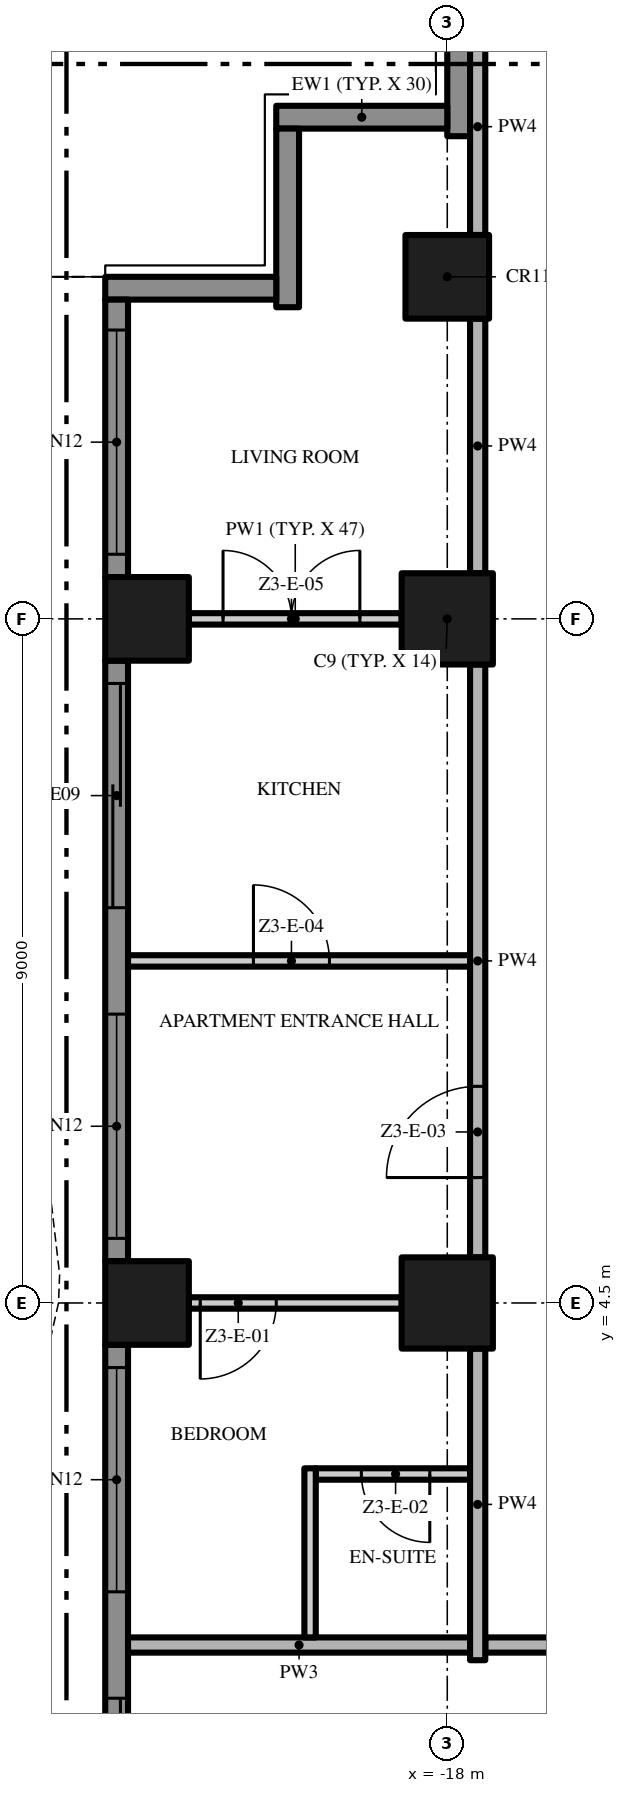
"""IFC4 building model, lengths in metres.
Left out: names, types, materials, properties, quantities, classifications, styles, units other than length and angle.
Written with IfcOpenShell. Run it as: python <this file> out.ifc"""

import sys

from ifc_helpers import new_model, si_unit, direction, frame, frame_2d, origin, origin_2d, place, context, subcontext, project, spatial, polyline, rectangle, outline, extrude, element, fill, save


model = new_model("IFC4")
c1 = context("Model", 3, precision=1e-05, world=origin(), true_north=direction((0.0, 1.0)))
c2 = subcontext(c1, "Body", "Model", "MODEL_VIEW")
j1 = project(units=[si_unit("LENGTHUNIT", "METRE"), si_unit("PLANEANGLEUNIT", "RADIAN")], contexts=[c1])
p1 = place(None, origin())
s1 = spatial("IfcSite", under=j1, at=p1, CompositionType="ELEMENT")
p2 = place(p1, origin())
s2 = spatial("IfcBuilding", under=s1, at=p2, CompositionType="ELEMENT")
p3 = place(p2, frame((0.0, 0.0, 170.6)))
s3 = spatial("IfcBuildingStorey", under=s2, at=p3, CompositionType="ELEMENT", Elevation=170.6)
for number, where, z_axis, x_axis in (
    (1, (-18.0, 13.5, 0.0), (0.0, 0.0, 1.0), (1.0, 0.0, 0.0)),
    (2, (-18.0, 4.5, 0.0), (0.0, 0.0, 1.0), (1.0, 0.0, 0.0)),
):
    element("IfcColumn", number, at=place(p3, frame(where, z_axis=z_axis, x_axis=x_axis)), inside=s3, PredefinedType="COLUMN", context=c2, shape_type="SweptSolid", body=[
        extrude(rectangle(XDim=1.2, YDim=1.2, at=origin_2d()), origin(), (0.0, 0.0, 1.0), 3.5),
    ])
for number, where, z_axis, x_axis in (
    (3, (-21.95, 13.5, 0.0), (0.0, 0.0, 1.0), (1.0, 0.0, 0.0)),
    (4, (-18.0, 18.0, 0.0), (0.0, 0.0, 1.0), (1.0, 0.0, 0.0)),
    (5, (-21.95, 4.5, 0.0), (0.0, 0.0, 1.0), (1.0, 0.0, 0.0)),
):
    element("IfcColumn", number, at=place(p3, frame(where, z_axis=z_axis, x_axis=x_axis)), inside=s3, PredefinedType="COLUMN", context=c2, shape_type="SweptSolid", body=[
        extrude(rectangle(XDim=1.1, YDim=1.1, at=origin_2d()), origin(), (0.0, 0.0, 1.0), 3.5),
    ])
p4 = place(p3, frame((-17.85, 19.85, 0.0), z_axis=(0.0, 0.0, 1.0), x_axis=(0.0, 1.0, 0.0)))
e6 = element("IfcWall", 6, at=p4, inside=s3, PredefinedType="SOLIDWALL", context=c2, shape_type="SweptSolid", body=[
    extrude(rectangle(XDim=1.55, YDim=0.3, at=frame_2d((0.775, 0.0))), origin(), (0.0, 0.0, 1.0), 3.5),
])
p5 = place(p3, frame((-20.25, 20.1, 0.0), z_axis=(0.0, 0.0, 1.0), x_axis=(1.0, 0.0, 0.0)))
e7 = element("IfcWall", 7, at=p5, inside=s3, PredefinedType="SOLIDWALL", context=c2, shape_type="SweptSolid", body=[
    extrude(rectangle(XDim=2.25, YDim=0.3, at=frame_2d((1.125, 0.0))), origin(), (0.0, 0.0, 1.0), 3.5),
])
p6 = place(p3, frame((-20.1, 17.6, 0.0), z_axis=(0.0, 0.0, 1.0), x_axis=(0.0, 1.0, 0.0)))
e8 = element("IfcWall", 8, at=p6, inside=s3, PredefinedType="SOLIDWALL", context=c2, shape_type="SweptSolid", body=[
    extrude(rectangle(XDim=2.35, YDim=0.3, at=frame_2d((1.175, 0.0))), origin(), (0.0, 0.0, 1.0), 3.5),
])
p7 = place(p3, frame((-22.5, 17.85, 0.0), z_axis=(0.0, 0.0, 1.0), x_axis=(1.0, 0.0, 0.0)))
e9 = element("IfcWall", 9, at=p7, inside=s3, PredefinedType="SOLIDWALL", context=c2, shape_type="SweptSolid", body=[
    extrude(rectangle(XDim=2.25, YDim=0.3, at=frame_2d((1.125, 0.0))), origin(), (0.0, 0.0, 1.0), 3.5),
])
p8 = place(p3, frame((-22.35, 14.05, 0.0), z_axis=(0.0, 0.0, 1.0), x_axis=(0.0, 1.0, 0.0)))
e10 = element("IfcWall", 10, at=p8, inside=s3, PredefinedType="SOLIDWALL", context=c2, shape_type="SweptSolid", body=[
    extrude(rectangle(XDim=3.65, YDim=0.3, at=frame_2d((1.825, 0.0))), origin(), (0.0, 0.0, 1.0), 3.5),
])
p9 = place(p8, frame((0.3, 0.0, 0.45)))
e11 = element("IfcOpeningElement", 11, at=p9, cuts=e10, PredefinedType="OPENING", context=c2, shape_type="SweptSolid", body=[
    extrude(rectangle(XDim=2.95, YDim=2.65, at=frame_2d((1.475, 1.325))), frame((0.0, 0.16, 0.0), z_axis=(0.0, -1.0, 0.0), x_axis=(1.0, 0.0, 0.0)), (0.0, 0.0, 1.0), 0.32),
])
p10 = place(p3, frame((-22.35, 5.05, 0.0), z_axis=(0.0, 0.0, 1.0), x_axis=(0.0, 1.0, 0.0)))
e12 = element("IfcWall", 12, at=p10, inside=s3, PredefinedType="SOLIDWALL", context=c2, shape_type="SweptSolid", body=[
    extrude(rectangle(XDim=7.9, YDim=0.3, at=frame_2d((3.95, 0.0))), origin(), (0.0, 0.0, 1.0), 3.5),
])
p11 = place(p10, frame((4.65, 0.0, 0.0)))
e13 = element("IfcOpeningElement", 13, at=p11, cuts=e12, PredefinedType="OPENING", context=c2, shape_type="SweptSolid", body=[
    extrude(rectangle(XDim=2.95, YDim=2.4, at=frame_2d((1.475, 1.2))), frame((0.0, 0.16, 0.0), z_axis=(0.0, -1.0, 0.0), x_axis=(1.0, 0.0, 0.0)), (0.0, 0.0, 1.0), 0.32),
])
p12 = place(p10, frame((0.3, 0.0, 0.45)))
e14 = element("IfcOpeningElement", 14, at=p12, cuts=e12, PredefinedType="OPENING", context=c2, shape_type="SweptSolid", body=[
    extrude(rectangle(XDim=2.95, YDim=2.65, at=frame_2d((1.475, 1.325))), frame((0.0, 0.16, 0.0), z_axis=(0.0, -1.0, 0.0), x_axis=(1.0, 0.0, 0.0)), (0.0, 0.0, 1.0), 0.32),
])
p13 = place(p3, frame((-22.35, -3.95, 0.0), z_axis=(0.0, 0.0, 1.0), x_axis=(0.0, 1.0, 0.0)))
e15 = element("IfcWall", 15, at=p13, inside=s3, PredefinedType="SOLIDWALL", context=c2, shape_type="SweptSolid", body=[
    extrude(rectangle(XDim=7.9, YDim=0.3, at=frame_2d((3.95, 0.0))), origin(), (0.0, 0.0, 1.0), 3.5),
])
p14 = place(p13, frame((4.65, 0.0, 0.45)))
e16 = element("IfcOpeningElement", 16, at=p14, cuts=e15, PredefinedType="OPENING", context=c2, shape_type="SweptSolid", body=[
    extrude(rectangle(XDim=2.95, YDim=2.65, at=frame_2d((1.475, 1.325))), frame((0.0, 0.16, 0.0), z_axis=(0.0, -1.0, 0.0), x_axis=(1.0, 0.0, 0.0)), (0.0, 0.0, 1.0), 0.32),
])
p15 = place(p13, frame((0.3, 0.0, 0.0)))
e17 = element("IfcOpeningElement", 17, at=p15, cuts=e15, PredefinedType="OPENING", context=c2, shape_type="SweptSolid", body=[
    extrude(rectangle(XDim=2.95, YDim=2.4, at=frame_2d((1.475, 1.2))), frame((0.0, 0.16, 0.0), z_axis=(0.0, -1.0, 0.0), x_axis=(1.0, 0.0, 0.0)), (0.0, 0.0, 1.0), 0.32),
])
p16 = place(p3, origin())
e18 = element("IfcWall", 18, at=p16, inside=s3, PredefinedType="USERDEFINED", context=c2, shape_type="SweptSolid", body=[
    extrude(outline(polyline([(-23.451, 18.0), (-24.112, 16.5), (-24.845, 15.0), (-25.369, 13.5), (-25.5, 12.375), (-25.485, 12.0), (-25.149, 10.5), (-24.488, 9.0), (-23.755, 7.5), (-23.231, 6.0), (-23.1, 4.875), (-23.115, 4.5), (-23.451, 3.0), (-24.112, 1.5), (-24.845, 0.0), (-25.369, -1.5), (-25.5, -2.625), (-25.485, -3.0), (-25.149, -4.5), (-24.488, -6.0), (-23.755, -7.5), (-23.231, -9.0), (-23.1, -10.125), (-23.115, -10.5), (-23.451, -12.0), (-24.112, -13.5), (-23.883, -13.601), (-23.213, -12.079), (-22.866, -10.533), (-22.849, -10.115), (-22.986, -8.944), (-23.524, -7.404), (-24.261, -5.895), (-24.91, -4.421), (-25.236, -2.967), (-25.249, -2.635), (-25.124, -1.556), (-24.614, -0.096), (-23.885, 1.395), (-23.213, 2.921), (-22.866, 4.467), (-22.849, 4.885), (-22.986, 6.056), (-23.524, 7.596), (-24.261, 9.105), (-24.91, 10.579), (-25.236, 12.033), (-25.249, 12.365), (-25.124, 13.444), (-24.614, 14.904), (-23.885, 16.395), (-23.223, 17.899), (-23.451, 18.0)])), origin(), (0.0, 0.0, 1.0), 0.9),
])
p17 = place(p3, frame((17.5, 0.0, 0.0), z_axis=(0.0, 0.0, 1.0), x_axis=(-1.0, 0.0, 0.0)))
e19 = element("IfcWall", 19, at=p17, inside=s3, PredefinedType="PARTITIONING", context=c2, shape_type="SweptSolid", body=[
    extrude(rectangle(XDim=35.0, YDim=0.2, at=frame_2d((17.5, 0.0))), origin(), (0.0, 0.0, 1.0), 3.5),
])
p18 = place(p17, frame((16.75, 0.0, 0.0)))
e20 = element("IfcOpeningElement", 20, at=p18, cuts=e19, PredefinedType="OPENING", context=c2, shape_type="SweptSolid", body=[
    extrude(rectangle(XDim=1.5, YDim=2.4, at=frame_2d((0.75, 1.2))), frame((0.0, 0.11, 0.0), z_axis=(0.0, -1.0, 0.0), x_axis=(1.0, 0.0, 0.0)), (0.0, 0.0, 1.0), 0.22),
])
p19 = place(p3, frame((-22.2, 0.0, 0.0), z_axis=(0.0, 0.0, 1.0), x_axis=(1.0, 0.0, 0.0)))
e21 = element("IfcWall", 21, at=p19, inside=s3, PredefinedType="PARTITIONING", context=c2, shape_type="SweptSolid", body=[
    extrude(rectangle(XDim=4.5, YDim=0.2, at=frame_2d((2.25, 0.0))), origin(), (0.0, 0.0, 1.0), 3.5),
])
p20 = place(p3, frame((-17.7, 2.25, 0.0), z_axis=(0.0, 0.0, 1.0), x_axis=(-1.0, 0.0, 0.0)))
e22 = element("IfcWall", 22, at=p20, inside=s3, PredefinedType="PARTITIONING", context=c2, shape_type="SweptSolid", body=[
    extrude(rectangle(XDim=2.03, YDim=0.15, at=frame_2d((1.015, 0.0))), origin(), (0.0, 0.0, 1.0), 3.5),
])
p21 = place(p20, frame((0.53, 0.0, 0.0)))
e23 = element("IfcOpeningElement", 23, at=p21, cuts=e22, PredefinedType="OPENING", context=c2, shape_type="SweptSolid", body=[
    extrude(rectangle(XDim=0.9, YDim=2.1, at=frame_2d((0.45, 1.05))), frame((0.0, 0.085, 0.0), z_axis=(0.0, -1.0, 0.0), x_axis=(1.0, 0.0, 0.0)), (0.0, 0.0, 1.0), 0.17),
])
p22 = place(p3, frame((-18.6, 4.5, 0.0), z_axis=(0.0, 0.0, 1.0), x_axis=(-1.0, 0.0, 0.0)))
e24 = element("IfcWall", 24, at=p22, inside=s3, PredefinedType="PARTITIONING", context=c2, shape_type="SweptSolid", body=[
    extrude(rectangle(XDim=2.8, YDim=0.15, at=frame_2d((1.4, 0.0))), origin(), (0.0, 0.0, 1.0), 3.5),
])
p23 = place(p22, frame((1.65, 0.0, 0.0)))
e25 = element("IfcOpeningElement", 25, at=p23, cuts=e24, PredefinedType="OPENING", context=c2, shape_type="SweptSolid", body=[
    extrude(rectangle(XDim=1.0, YDim=2.4, at=frame_2d((0.5, 1.2))), frame((0.0, 0.085, 0.0), z_axis=(0.0, -1.0, 0.0), x_axis=(1.0, 0.0, 0.0)), (0.0, 0.0, 1.0), 0.17),
])
p24 = place(p3, frame((-22.2, 9.0, 0.0), z_axis=(0.0, 0.0, 1.0), x_axis=(1.0, 0.0, 0.0)))
e26 = element("IfcWall", 26, at=p24, inside=s3, PredefinedType="PARTITIONING", context=c2, shape_type="SweptSolid", body=[
    extrude(rectangle(XDim=4.5, YDim=0.15, at=frame_2d((2.25, 0.0))), origin(), (0.0, 0.0, 1.0), 3.5),
])
p25 = place(p24, frame((1.65, 0.0, 0.0)))
e27 = element("IfcOpeningElement", 27, at=p25, cuts=e26, PredefinedType="OPENING", context=c2, shape_type="SweptSolid", body=[
    extrude(rectangle(XDim=1.0, YDim=2.4, at=frame_2d((0.5, 1.2))), frame((0.0, 0.085, 0.0), z_axis=(0.0, -1.0, 0.0), x_axis=(1.0, 0.0, 0.0)), (0.0, 0.0, 1.0), 0.17),
])
p26 = place(p3, frame((-21.4, 13.5, 0.0), z_axis=(0.0, 0.0, 1.0), x_axis=(1.0, 0.0, 0.0)))
e28 = element("IfcWall", 28, at=p26, inside=s3, PredefinedType="PARTITIONING", context=c2, shape_type="SweptSolid", body=[
    extrude(rectangle(XDim=2.8, YDim=0.15, at=frame_2d((1.4, 0.0))), origin(), (0.0, 0.0, 1.0), 3.5),
])
p27 = place(p26, frame((0.45, 0.0, 0.0)))
e29 = element("IfcOpeningElement", 29, at=p27, cuts=e28, PredefinedType="OPENING", context=c2, shape_type="SweptSolid", body=[
    extrude(rectangle(XDim=1.8, YDim=2.4, at=frame_2d((0.9, 1.2))), frame((0.0, 0.085, 0.0), z_axis=(0.0, -1.0, 0.0), x_axis=(1.0, 0.0, 0.0)), (0.0, 0.0, 1.0), 0.17),
])
p28 = place(p3, frame((-19.805, 0.1, 0.0), z_axis=(0.0, 0.0, 1.0), x_axis=(0.0, 1.0, 0.0)))
e30 = element("IfcWall", 30, at=p28, inside=s3, PredefinedType="PARTITIONING", context=c2, shape_type="SweptSolid", body=[
    extrude(rectangle(XDim=2.225, YDim=0.15, at=frame_2d((1.113, 0.0))), origin(), (0.0, 0.0, 1.0), 3.5),
])
p29 = place(p3, frame((-17.6, -0.2, 0.0), z_axis=(0.0, 0.0, 1.0), x_axis=(0.0, 1.0, 0.0)))
e31 = element("IfcWall", 31, at=p29, inside=s3, PredefinedType="PARTITIONING", context=c2, shape_type="SweptSolid", body=[
    extrude(rectangle(XDim=4.1, YDim=0.2, at=frame_2d((2.05, 0.0))), origin(), (0.0, 0.0, 1.0), 3.5),
])
p30 = place(p3, frame((-17.6, 5.1, 0.0), z_axis=(0.0, 0.0, 1.0), x_axis=(0.0, 1.0, 0.0)))
e32 = element("IfcWall", 32, at=p30, inside=s3, PredefinedType="PARTITIONING", context=c2, shape_type="SweptSolid", body=[
    extrude(rectangle(XDim=7.8, YDim=0.2, at=frame_2d((3.9, 0.0))), origin(), (0.0, 0.0, 1.0), 3.5),
])
p31 = place(p30, frame((1.05, 0.0, 0.0)))
e33 = element("IfcOpeningElement", 33, at=p31, cuts=e32, PredefinedType="OPENING", context=c2, shape_type="SweptSolid", body=[
    extrude(rectangle(XDim=1.2, YDim=2.4, at=frame_2d((0.6, 1.2))), frame((0.0, 0.11, 0.0), z_axis=(0.0, -1.0, 0.0), x_axis=(1.0, 0.0, 0.0)), (0.0, 0.0, 1.0), 0.22),
])
p32 = place(p3, frame((-17.6, 14.1, 0.0), z_axis=(0.0, 0.0, 1.0), x_axis=(0.0, 1.0, 0.0)))
e34 = element("IfcWall", 34, at=p32, inside=s3, PredefinedType="PARTITIONING", context=c2, shape_type="SweptSolid", body=[
    extrude(rectangle(XDim=3.35, YDim=0.2, at=frame_2d((1.675, 0.0))), origin(), (0.0, 0.0, 1.0), 3.5),
])
p33 = place(p3, frame((-17.6, 18.55, 0.0), z_axis=(0.0, 0.0, 1.0), x_axis=(0.0, 1.0, 0.0)))
e35 = element("IfcWall", 35, at=p33, inside=s3, PredefinedType="PARTITIONING", context=c2, shape_type="SweptSolid", body=[
    extrude(rectangle(XDim=2.85, YDim=0.2, at=frame_2d((1.425, 0.0))), origin(), (0.0, 0.0, 1.0), 3.5),
])
p34 = place(p9, origin())
e36 = element("IfcWindow", 36, at=p34, inside=s3, PartitioningType="SINGLE_PANEL", PredefinedType="WINDOW", context=c2, shape_type="SweptSolid", body=[
    extrude(rectangle(XDim=2.95, YDim=2.65, at=frame_2d((1.475, 1.325))), frame((0.0, 0.03, 0.0), z_axis=(0.0, -1.0, 0.0), x_axis=(1.0, 0.0, 0.0)), (0.0, 0.0, 1.0), 0.06),
])
fill(e11, e36)
p35 = place(p11, origin())
e37 = element("IfcDoor", 37, at=p35, inside=s3, OperationType="SINGLE_SWING_LEFT", PredefinedType="DOOR", context=c2, shape_type="SweptSolid", body=[
    extrude(rectangle(XDim=2.95, YDim=2.4, at=frame_2d((1.475, 1.2))), frame((0.0, 0.025, 0.0), z_axis=(0.0, -1.0, 0.0), x_axis=(1.0, 0.0, 0.0)), (0.0, 0.0, 1.0), 0.05),
])
fill(e13, e37)
p36 = place(p12, origin())
e38 = element("IfcWindow", 38, at=p36, inside=s3, PartitioningType="SINGLE_PANEL", PredefinedType="WINDOW", context=c2, shape_type="SweptSolid", body=[
    extrude(rectangle(XDim=2.95, YDim=2.65, at=frame_2d((1.475, 1.325))), frame((0.0, 0.03, 0.0), z_axis=(0.0, -1.0, 0.0), x_axis=(1.0, 0.0, 0.0)), (0.0, 0.0, 1.0), 0.06),
])
fill(e14, e38)
p37 = place(p14, origin())
e39 = element("IfcWindow", 39, at=p37, inside=s3, PartitioningType="SINGLE_PANEL", PredefinedType="WINDOW", context=c2, shape_type="SweptSolid", body=[
    extrude(rectangle(XDim=2.95, YDim=2.65, at=frame_2d((1.475, 1.325))), frame((0.0, 0.03, 0.0), z_axis=(0.0, -1.0, 0.0), x_axis=(1.0, 0.0, 0.0)), (0.0, 0.0, 1.0), 0.06),
])
fill(e16, e39)
p38 = place(p15, origin())
e40 = element("IfcDoor", 40, at=p38, inside=s3, OperationType="SINGLE_SWING_LEFT", PredefinedType="DOOR", context=c2, shape_type="SweptSolid", body=[
    extrude(rectangle(XDim=2.95, YDim=2.4, at=frame_2d((1.475, 1.2))), frame((0.0, 0.025, 0.0), z_axis=(0.0, -1.0, 0.0), x_axis=(1.0, 0.0, 0.0)), (0.0, 0.0, 1.0), 0.05),
])
fill(e17, e40)
p39 = place(p23, origin())
e41 = element("IfcDoor", 41, at=p39, inside=s3, OperationType="SINGLE_SWING_RIGHT", PredefinedType="DOOR", context=c2, shape_type="SweptSolid", body=[
    extrude(rectangle(XDim=1.0, YDim=2.4, at=frame_2d((0.5, 1.2))), frame((0.0, 0.025, 0.0), z_axis=(0.0, -1.0, 0.0), x_axis=(1.0, 0.0, 0.0)), (0.0, 0.0, 1.0), 0.05),
])
fill(e25, e41)
p40 = place(p21, origin())
e42 = element("IfcDoor", 42, at=p40, inside=s3, OperationType="SINGLE_SWING_LEFT", PredefinedType="DOOR", context=c2, shape_type="SweptSolid", body=[
    extrude(rectangle(XDim=0.9, YDim=2.1, at=frame_2d((0.45, 1.05))), frame((0.0, 0.025, 0.0), z_axis=(0.0, -1.0, 0.0), x_axis=(1.0, 0.0, 0.0)), (0.0, 0.0, 1.0), 0.05),
])
fill(e23, e42)
p41 = place(p31, origin())
e43 = element("IfcDoor", 43, at=p41, inside=s3, OperationType="SINGLE_SWING_LEFT", PredefinedType="DOOR", context=c2, shape_type="SweptSolid", body=[
    extrude(rectangle(XDim=1.2, YDim=2.4, at=frame_2d((0.6, 1.2))), frame((0.0, 0.025, 0.0), z_axis=(0.0, -1.0, 0.0), x_axis=(1.0, 0.0, 0.0)), (0.0, 0.0, 1.0), 0.05),
])
fill(e33, e43)
p42 = place(p25, origin())
e44 = element("IfcDoor", 44, at=p42, inside=s3, OperationType="SINGLE_SWING_LEFT", PredefinedType="DOOR", context=c2, shape_type="SweptSolid", body=[
    extrude(rectangle(XDim=1.0, YDim=2.4, at=frame_2d((0.5, 1.2))), frame((0.0, 0.025, 0.0), z_axis=(0.0, -1.0, 0.0), x_axis=(1.0, 0.0, 0.0)), (0.0, 0.0, 1.0), 0.05),
])
fill(e27, e44)
p43 = place(p27, origin())
e45 = element("IfcDoor", 45, at=p43, inside=s3, OperationType="DOUBLE_DOOR_SINGLE_SWING", PredefinedType="DOOR", context=c2, shape_type="SweptSolid", body=[
    extrude(rectangle(XDim=1.8, YDim=2.4, at=frame_2d((0.9, 1.2))), frame((0.0, 0.025, 0.0), z_axis=(0.0, -1.0, 0.0), x_axis=(1.0, 0.0, 0.0)), (0.0, 0.0, 1.0), 0.05),
])
fill(e29, e45)
save(model, sys.argv[1])
